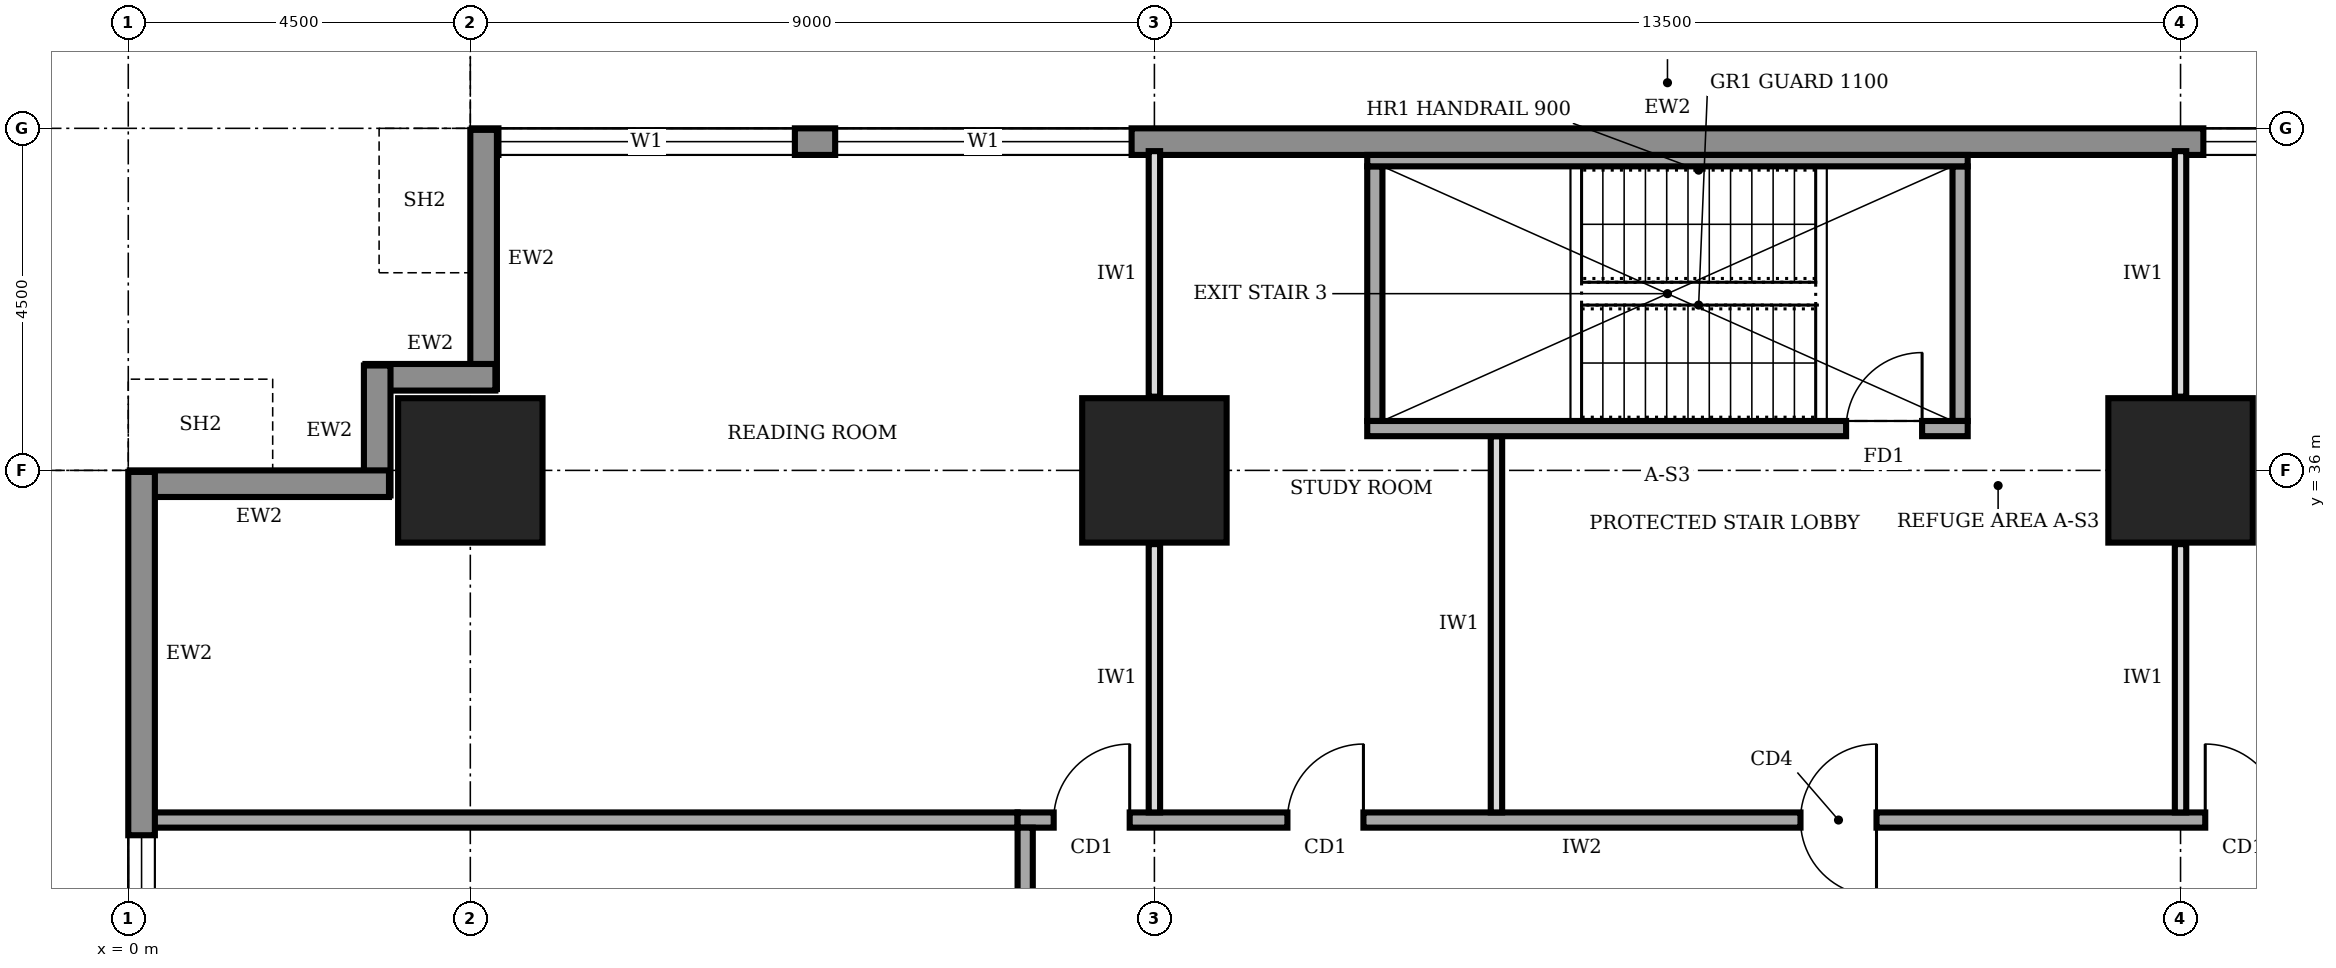
"""IFC4 building model, lengths in metres.
Left out: names, types, materials, properties, quantities, classifications, styles, units other than length and angle.
Written with IfcOpenShell. Run it as: python <this file> out.ifc"""

import sys

from ifc_helpers import new_model, si_unit, direction, frame, frame_2d, origin, origin_2d, place, context, subcontext, project, spatial, rectangle, extrude, element, fill, save


model = new_model("IFC4")
c1 = context("Model", 3, precision=1e-05, world=origin(), true_north=direction((0.0, 1.0)))
c2 = subcontext(c1, "Body", "Model", "MODEL_VIEW")
j1 = project(units=[si_unit("LENGTHUNIT", "METRE"), si_unit("PLANEANGLEUNIT", "RADIAN")], contexts=[c1])
p1 = place(None, origin())
s1 = spatial("IfcSite", under=j1, at=p1, CompositionType="ELEMENT")
p2 = place(p1, origin())
s2 = spatial("IfcBuilding", under=s1, at=p2, CompositionType="ELEMENT")
p3 = place(p2, frame((0.0, 0.0, 133.0)))
s3 = spatial("IfcBuildingStorey", under=s2, at=p3, CompositionType="ELEMENT", Elevation=133.0)
for number, where, z_axis, x_axis in (
    (1, (4.5, 36.0, 0.0), (0.0, 0.0, 1.0), (1.0, 0.0, 0.0)),
    (2, (13.5, 36.0, 0.0), (0.0, 0.0, 1.0), (1.0, 0.0, 0.0)),
    (3, (27.0, 36.0, 0.0), (0.0, 0.0, 1.0), (1.0, 0.0, 0.0)),
):
    element("IfcColumn", number, at=place(p3, frame(where, z_axis=z_axis, x_axis=x_axis)), inside=s3, PredefinedType="COLUMN", context=c2, shape_type="SweptSolid", body=[
        extrude(rectangle(XDim=1.9, YDim=1.9, at=origin_2d()), origin(), (0.0, 0.0, 1.0), 4.0),
    ])
p4 = place(p3, frame((35.98, 40.325, 0.0), z_axis=(0.0, 0.0, 1.0), x_axis=(-1.0, 0.0, 0.0)))
e4 = element("IfcWall", 4, at=p4, inside=s3, PredefinedType="STANDARD", context=c2, shape_type="SweptSolid", body=[
    extrude(rectangle(XDim=31.46, YDim=0.35, at=frame_2d((15.73, 0.0))), origin(), (0.0, 0.0, 1.0), 3.75),
])
p5 = place(p4, frame((27.21, 0.0, 0.9)))
e5 = element("IfcOpeningElement", 5, at=p5, cuts=e4, PredefinedType="OPENING", context=c2, shape_type="SweptSolid", body=[
    extrude(rectangle(XDim=3.9, YDim=2.2, at=frame_2d((1.95, 1.1))), frame((0.0, 0.185, 0.0), z_axis=(0.0, -1.0, 0.0), x_axis=(1.0, 0.0, 0.0)), (0.0, 0.0, 1.0), 0.37),
])
p6 = place(p4, frame((22.78, 0.0, 0.9)))
e6 = element("IfcOpeningElement", 6, at=p6, cuts=e4, PredefinedType="OPENING", context=c2, shape_type="SweptSolid", body=[
    extrude(rectangle(XDim=3.9, YDim=2.2, at=frame_2d((1.95, 1.1))), frame((0.0, 0.185, 0.0), z_axis=(0.0, -1.0, 0.0), x_axis=(1.0, 0.0, 0.0)), (0.0, 0.0, 1.0), 0.37),
])
p7 = place(p4, frame((4.78, 0.0, 0.9)))
e7 = element("IfcOpeningElement", 7, at=p7, cuts=e4, PredefinedType="OPENING", context=c2, shape_type="SweptSolid", body=[
    extrude(rectangle(XDim=3.9, YDim=2.2, at=frame_2d((1.95, 1.1))), frame((0.0, 0.185, 0.0), z_axis=(0.0, -1.0, 0.0), x_axis=(1.0, 0.0, 0.0)), (0.0, 0.0, 1.0), 0.37),
])
p8 = place(p3, frame((4.675, 40.48, 0.0), z_axis=(0.0, 0.0, 1.0), x_axis=(0.0, -1.0, 0.0)))
e8 = element("IfcWall", 8, at=p8, inside=s3, PredefinedType="STANDARD", context=c2, shape_type="SweptSolid", body=[
    extrude(rectangle(XDim=3.41, YDim=0.35, at=frame_2d((1.705, 0.0))), origin(), (0.0, 0.0, 1.0), 2.85),
])
for number, where, z_axis, x_axis in (
    (9, (4.83, 37.225, 0.0), (0.0, 0.0, 1.0), (-1.0, 0.0, 0.0)),
    (10, (3.275, 37.38, 0.0), (0.0, 0.0, 1.0), (0.0, -1.0, 0.0)),
):
    element("IfcWall", number, at=place(p3, frame(where, z_axis=z_axis, x_axis=x_axis)), inside=s3, PredefinedType="STANDARD", context=c2, shape_type="SweptSolid", body=[
        extrude(rectangle(XDim=1.71, YDim=0.35, at=frame_2d((0.855, 0.0))), origin(), (0.0, 0.0, 1.0), 3.75),
    ])
p9 = place(p3, frame((3.43, 35.825, 0.0), z_axis=(0.0, 0.0, 1.0), x_axis=(-1.0, 0.0, 0.0)))
e11 = element("IfcWall", 11, at=p9, inside=s3, PredefinedType="STANDARD", context=c2, shape_type="SweptSolid", body=[
    extrude(rectangle(XDim=3.41, YDim=0.35, at=frame_2d((1.705, 0.0))), origin(), (0.0, 0.0, 1.0), 2.85),
])
p10 = place(p3, frame((0.175, 35.98, 0.0), z_axis=(0.0, 0.0, 1.0), x_axis=(0.0, -1.0, 0.0)))
e12 = element("IfcWall", 12, at=p10, inside=s3, PredefinedType="STANDARD", context=c2, shape_type="SweptSolid", body=[
    extrude(rectangle(XDim=31.46, YDim=0.35, at=frame_2d((15.73, 0.0))), origin(), (0.0, 0.0, 1.0), 3.75),
])
p11 = place(p10, frame((27.21, 0.0, 0.9)))
e13 = element("IfcOpeningElement", 13, at=p11, cuts=e12, PredefinedType="OPENING", context=c2, shape_type="SweptSolid", body=[
    extrude(rectangle(XDim=3.9, YDim=2.2, at=frame_2d((1.95, 1.1))), frame((0.0, 0.185, 0.0), z_axis=(0.0, -1.0, 0.0), x_axis=(1.0, 0.0, 0.0)), (0.0, 0.0, 1.0), 0.37),
])
p12 = place(p10, frame((22.78, 0.0, 0.9)))
e14 = element("IfcOpeningElement", 14, at=p12, cuts=e12, PredefinedType="OPENING", context=c2, shape_type="SweptSolid", body=[
    extrude(rectangle(XDim=3.9, YDim=2.2, at=frame_2d((1.95, 1.1))), frame((0.0, 0.185, 0.0), z_axis=(0.0, -1.0, 0.0), x_axis=(1.0, 0.0, 0.0)), (0.0, 0.0, 1.0), 0.37),
])
p13 = place(p10, frame((18.28, 0.0, 0.9)))
e15 = element("IfcOpeningElement", 15, at=p13, cuts=e12, PredefinedType="OPENING", context=c2, shape_type="SweptSolid", body=[
    extrude(rectangle(XDim=3.9, YDim=2.2, at=frame_2d((1.95, 1.1))), frame((0.0, 0.185, 0.0), z_axis=(0.0, -1.0, 0.0), x_axis=(1.0, 0.0, 0.0)), (0.0, 0.0, 1.0), 0.37),
])
p14 = place(p10, frame((13.78, 0.0, 0.9)))
e16 = element("IfcOpeningElement", 16, at=p14, cuts=e12, PredefinedType="OPENING", context=c2, shape_type="SweptSolid", body=[
    extrude(rectangle(XDim=3.9, YDim=2.2, at=frame_2d((1.95, 1.1))), frame((0.0, 0.185, 0.0), z_axis=(0.0, -1.0, 0.0), x_axis=(1.0, 0.0, 0.0)), (0.0, 0.0, 1.0), 0.37),
])
p15 = place(p10, frame((9.28, 0.0, 0.9)))
e17 = element("IfcOpeningElement", 17, at=p15, cuts=e12, PredefinedType="OPENING", context=c2, shape_type="SweptSolid", body=[
    extrude(rectangle(XDim=3.9, YDim=2.2, at=frame_2d((1.95, 1.1))), frame((0.0, 0.185, 0.0), z_axis=(0.0, -1.0, 0.0), x_axis=(1.0, 0.0, 0.0)), (0.0, 0.0, 1.0), 0.37),
])
p16 = place(p10, frame((4.78, 0.0, 0.9)))
e18 = element("IfcOpeningElement", 18, at=p16, cuts=e12, PredefinedType="OPENING", context=c2, shape_type="SweptSolid", body=[
    extrude(rectangle(XDim=3.9, YDim=2.2, at=frame_2d((1.95, 1.1))), frame((0.0, 0.185, 0.0), z_axis=(0.0, -1.0, 0.0), x_axis=(1.0, 0.0, 0.0)), (0.0, 0.0, 1.0), 0.37),
])
p17 = place(p3, frame((28.6, 31.4, 0.0), z_axis=(0.0, 0.0, 1.0), x_axis=(-1.0, 0.0, 0.0)))
e19 = element("IfcWall", 19, at=p17, inside=s3, PredefinedType="SOLIDWALL", context=c2, shape_type="SweptSolid", body=[
    extrude(rectangle(XDim=16.9, YDim=0.2, at=frame_2d((8.45, 0.0))), origin(), (0.0, 0.0, 1.0), 3.75),
])
p18 = place(p17, frame((15.425, 0.0, 0.0)))
e20 = element("IfcOpeningElement", 20, at=p18, cuts=e19, PredefinedType="OPENING", context=c2, shape_type="SweptSolid", body=[
    extrude(rectangle(XDim=1.0, YDim=2.1, at=frame_2d((0.5, 1.05))), frame((0.0, 0.11, 0.0), z_axis=(0.0, -1.0, 0.0), x_axis=(1.0, 0.0, 0.0)), (0.0, 0.0, 1.0), 0.22),
])
p19 = place(p17, frame((12.35, 0.0, 0.0)))
e21 = element("IfcOpeningElement", 21, at=p19, cuts=e19, PredefinedType="OPENING", context=c2, shape_type="SweptSolid", body=[
    extrude(rectangle(XDim=1.0, YDim=2.1, at=frame_2d((0.5, 1.05))), frame((0.0, 0.11, 0.0), z_axis=(0.0, -1.0, 0.0), x_axis=(1.0, 0.0, 0.0)), (0.0, 0.0, 1.0), 0.22),
])
p20 = place(p17, frame((5.6, 0.0, 0.0)))
e22 = element("IfcOpeningElement", 22, at=p20, cuts=e19, PredefinedType="OPENING", context=c2, shape_type="SweptSolid", body=[
    extrude(rectangle(XDim=1.0, YDim=2.1, at=frame_2d((0.5, 1.05))), frame((0.0, 0.11, 0.0), z_axis=(0.0, -1.0, 0.0), x_axis=(1.0, 0.0, 0.0)), (0.0, 0.0, 1.0), 0.22),
])
p21 = place(p17, frame((0.275, 0.0, 0.0)))
e23 = element("IfcOpeningElement", 23, at=p21, cuts=e19, PredefinedType="OPENING", context=c2, shape_type="SweptSolid", body=[
    extrude(rectangle(XDim=1.0, YDim=2.1, at=frame_2d((0.5, 1.05))), frame((0.0, 0.11, 0.0), z_axis=(0.0, -1.0, 0.0), x_axis=(1.0, 0.0, 0.0)), (0.0, 0.0, 1.0), 0.22),
])
p22 = place(p3, frame((11.8, 31.3, 0.0), z_axis=(0.0, 0.0, 1.0), x_axis=(0.0, -1.0, 0.0)))
e24 = element("IfcWall", 24, at=p22, inside=s3, PredefinedType="SOLIDWALL", context=c2, shape_type="SweptSolid", body=[
    extrude(rectangle(XDim=23.8, YDim=0.2, at=frame_2d((11.9, 0.0))), origin(), (0.0, 0.0, 1.0), 3.75),
])
p23 = place(p22, frame((20.3, 0.0, 0.0)))
e25 = element("IfcOpeningElement", 25, at=p23, cuts=e24, PredefinedType="OPENING", context=c2, shape_type="SweptSolid", body=[
    extrude(rectangle(XDim=1.0, YDim=2.1, at=frame_2d((0.5, 1.05))), frame((0.0, 0.11, 0.0), z_axis=(0.0, -1.0, 0.0), x_axis=(1.0, 0.0, 0.0)), (0.0, 0.0, 1.0), 0.22),
])
p24 = place(p22, frame((15.45, 0.0, 0.0)))
e26 = element("IfcOpeningElement", 26, at=p24, cuts=e24, PredefinedType="OPENING", context=c2, shape_type="SweptSolid", body=[
    extrude(rectangle(XDim=0.9, YDim=2.1, at=frame_2d((0.45, 1.05))), frame((0.0, 0.11, 0.0), z_axis=(0.0, -1.0, 0.0), x_axis=(1.0, 0.0, 0.0)), (0.0, 0.0, 1.0), 0.22),
])
p25 = place(p22, frame((12.45, 0.0, 0.0)))
e27 = element("IfcOpeningElement", 27, at=p25, cuts=e24, PredefinedType="OPENING", context=c2, shape_type="SweptSolid", body=[
    extrude(rectangle(XDim=0.9, YDim=2.1, at=frame_2d((0.45, 1.05))), frame((0.0, 0.11, 0.0), z_axis=(0.0, -1.0, 0.0), x_axis=(1.0, 0.0, 0.0)), (0.0, 0.0, 1.0), 0.22),
])
p26 = place(p22, frame((7.6, 0.0, 0.0)))
e28 = element("IfcOpeningElement", 28, at=p26, cuts=e24, PredefinedType="OPENING", context=c2, shape_type="SweptSolid", body=[
    extrude(rectangle(XDim=0.9, YDim=2.1, at=frame_2d((0.45, 1.05))), frame((0.0, 0.11, 0.0), z_axis=(0.0, -1.0, 0.0), x_axis=(1.0, 0.0, 0.0)), (0.0, 0.0, 1.0), 0.22),
])
p27 = place(p22, frame((4.8, 0.0, 0.0)))
e29 = element("IfcOpeningElement", 29, at=p27, cuts=e24, PredefinedType="OPENING", context=c2, shape_type="SweptSolid", body=[
    extrude(rectangle(XDim=1.0, YDim=2.1, at=frame_2d((0.5, 1.05))), frame((0.0, 0.11, 0.0), z_axis=(0.0, -1.0, 0.0), x_axis=(1.0, 0.0, 0.0)), (0.0, 0.0, 1.0), 0.22),
])
p28 = place(p22, frame((10.3, 0.0, 0.0)))
e30 = element("IfcOpeningElement", 30, at=p28, cuts=e24, PredefinedType="OPENING", context=c2, shape_type="SweptSolid", body=[
    extrude(rectangle(XDim=1.0, YDim=2.1, at=frame_2d((0.5, 1.05))), frame((0.0, 0.11, 0.0), z_axis=(0.0, -1.0, 0.0), x_axis=(1.0, 0.0, 0.0)), (0.0, 0.0, 1.0), 0.22),
])
p29 = place(p22, frame((1.55, 0.0, 0.0)))
e31 = element("IfcOpeningElement", 31, at=p29, cuts=e24, PredefinedType="OPENING", context=c2, shape_type="SweptSolid", body=[
    extrude(rectangle(XDim=1.0, YDim=2.1, at=frame_2d((0.5, 1.05))), frame((0.0, 0.11, 0.0), z_axis=(0.0, -1.0, 0.0), x_axis=(1.0, 0.0, 0.0)), (0.0, 0.0, 1.0), 0.22),
])
p30 = place(p3, frame((0.3, 31.4, 0.0), z_axis=(0.0, 0.0, 1.0), x_axis=(1.0, 0.0, 0.0)))
e32 = element("IfcWall", 32, at=p30, inside=s3, PredefinedType="SOLIDWALL", context=c2, shape_type="SweptSolid", body=[
    extrude(rectangle(XDim=11.4, YDim=0.2, at=frame_2d((5.7, 0.0))), origin(), (0.0, 0.0, 1.0), 3.75),
])
p31 = place(p3, frame((13.5, 31.5, 0.0), z_axis=(0.0, 0.0, 1.0), x_axis=(0.0, 1.0, 0.0)))
e33 = element("IfcWall", 33, at=p31, inside=s3, PredefinedType="PARTITIONING", context=c2, shape_type="SweptSolid", body=[
    extrude(rectangle(XDim=3.53, YDim=0.15, at=frame_2d((1.765, 0.0))), origin(), (0.0, 0.0, 1.0), 2.85),
])
p32 = place(p3, frame((13.5, 36.97, 0.0), z_axis=(0.0, 0.0, 1.0), x_axis=(0.0, 1.0, 0.0)))
e34 = element("IfcWall", 34, at=p32, inside=s3, PredefinedType="PARTITIONING", context=c2, shape_type="SweptSolid", body=[
    extrude(rectangle(XDim=3.23, YDim=0.15, at=frame_2d((1.615, 0.0))), origin(), (0.0, 0.0, 1.0), 2.85),
])
p33 = place(p3, frame((18.0, 31.5, 0.0), z_axis=(0.0, 0.0, 1.0), x_axis=(0.0, 1.0, 0.0)))
e35 = element("IfcWall", 35, at=p33, inside=s3, PredefinedType="PARTITIONING", context=c2, shape_type="SweptSolid", body=[
    extrude(rectangle(XDim=4.95, YDim=0.15, at=frame_2d((2.475, 0.0))), origin(), (0.0, 0.0, 1.0), 3.75),
])
p34 = place(p3, frame((27.0, 31.5, 0.0), z_axis=(0.0, 0.0, 1.0), x_axis=(0.0, 1.0, 0.0)))
e36 = element("IfcWall", 36, at=p34, inside=s3, PredefinedType="PARTITIONING", context=c2, shape_type="SweptSolid", body=[
    extrude(rectangle(XDim=3.53, YDim=0.15, at=frame_2d((1.765, 0.0))), origin(), (0.0, 0.0, 1.0), 2.85),
])
p35 = place(p3, frame((27.0, 36.97, 0.0), z_axis=(0.0, 0.0, 1.0), x_axis=(0.0, 1.0, 0.0)))
e37 = element("IfcWall", 37, at=p35, inside=s3, PredefinedType="PARTITIONING", context=c2, shape_type="SweptSolid", body=[
    extrude(rectangle(XDim=3.23, YDim=0.15, at=frame_2d((1.615, 0.0))), origin(), (0.0, 0.0, 1.0), 2.85),
])
p36 = place(p3, frame((16.3, 36.55, 0.0), z_axis=(0.0, 0.0, 1.0), x_axis=(1.0, 0.0, 0.0)))
e38 = element("IfcWall", 38, at=p36, inside=s3, PredefinedType="SOLIDWALL", context=c2, shape_type="SweptSolid", body=[
    extrude(rectangle(XDim=7.9, YDim=0.2, at=frame_2d((3.95, 0.0))), origin(), (0.0, 0.0, 1.0), 3.75),
])
p37 = place(p36, frame((6.3, 0.0, 0.0)))
e39 = element("IfcOpeningElement", 39, at=p37, cuts=e38, PredefinedType="OPENING", context=c2, shape_type="SweptSolid", body=[
    extrude(rectangle(XDim=1.0, YDim=2.1, at=frame_2d((0.5, 1.05))), frame((0.0, 0.11, 0.0), z_axis=(0.0, -1.0, 0.0), x_axis=(1.0, 0.0, 0.0)), (0.0, 0.0, 1.0), 0.22),
])
p38 = place(p3, frame((16.3, 40.075, 0.0), z_axis=(0.0, 0.0, 1.0), x_axis=(1.0, 0.0, 0.0)))
e40 = element("IfcWall", 40, at=p38, inside=s3, PredefinedType="SOLIDWALL", context=c2, shape_type="SweptSolid", body=[
    extrude(rectangle(XDim=7.9, YDim=0.15, at=frame_2d((3.95, 0.0))), origin(), (0.0, 0.0, 1.0), 3.75),
])
for number, where, z_axis, x_axis in (
    (41, (16.4, 36.65, 0.0), (0.0, 0.0, 1.0), (0.0, 1.0, 0.0)),
    (42, (24.1, 36.65, 0.0), (0.0, 0.0, 1.0), (0.0, 1.0, 0.0)),
):
    element("IfcWall", number, at=place(p3, frame(where, z_axis=z_axis, x_axis=x_axis)), inside=s3, PredefinedType="SOLIDWALL", context=c2, shape_type="SweptSolid", body=[
        extrude(rectangle(XDim=3.35, YDim=0.2, at=frame_2d((1.675, 0.0))), origin(), (0.0, 0.0, 1.0), 3.75),
    ])
p39 = place(p5, origin())
e43 = element("IfcWindow", 43, at=p39, inside=s3, PartitioningType="SINGLE_PANEL", PredefinedType="WINDOW", context=c2, shape_type="SweptSolid", body=[
    extrude(rectangle(XDim=3.9, YDim=2.2, at=frame_2d((1.95, 1.1))), frame((0.0, 0.03, 0.0), z_axis=(0.0, -1.0, 0.0), x_axis=(1.0, 0.0, 0.0)), (0.0, 0.0, 1.0), 0.06),
])
fill(e5, e43)
p40 = place(p6, origin())
e44 = element("IfcWindow", 44, at=p40, inside=s3, PartitioningType="SINGLE_PANEL", PredefinedType="WINDOW", context=c2, shape_type="SweptSolid", body=[
    extrude(rectangle(XDim=3.9, YDim=2.2, at=frame_2d((1.95, 1.1))), frame((0.0, 0.03, 0.0), z_axis=(0.0, -1.0, 0.0), x_axis=(1.0, 0.0, 0.0)), (0.0, 0.0, 1.0), 0.06),
])
fill(e6, e44)
p41 = place(p7, origin())
e45 = element("IfcWindow", 45, at=p41, inside=s3, PartitioningType="SINGLE_PANEL", PredefinedType="WINDOW", context=c2, shape_type="SweptSolid", body=[
    extrude(rectangle(XDim=3.9, YDim=2.2, at=frame_2d((1.95, 1.1))), frame((0.0, 0.03, 0.0), z_axis=(0.0, -1.0, 0.0), x_axis=(1.0, 0.0, 0.0)), (0.0, 0.0, 1.0), 0.06),
])
fill(e7, e45)
p42 = place(p16, origin())
e46 = element("IfcWindow", 46, at=p42, inside=s3, PartitioningType="SINGLE_PANEL", PredefinedType="WINDOW", context=c2, shape_type="SweptSolid", body=[
    extrude(rectangle(XDim=3.9, YDim=2.2, at=frame_2d((1.95, 1.1))), frame((0.0, 0.03, 0.0), z_axis=(0.0, -1.0, 0.0), x_axis=(1.0, 0.0, 0.0)), (0.0, 0.0, 1.0), 0.06),
])
fill(e18, e46)
p43 = place(p18, frame((1.0, 0.0, 0.0), z_axis=(0.0, 0.0, 1.0), x_axis=(-1.0, 0.0, 0.0)))
e47 = element("IfcDoor", 47, at=p43, inside=s3, OperationType="SINGLE_SWING_RIGHT", PredefinedType="DOOR", context=c2, shape_type="SweptSolid", body=[
    extrude(rectangle(XDim=1.0, YDim=2.1, at=frame_2d((0.5, 1.05))), frame((0.0, 0.025, 0.0), z_axis=(0.0, -1.0, 0.0), x_axis=(1.0, 0.0, 0.0)), (0.0, 0.0, 1.0), 0.05),
])
fill(e20, e47)
p44 = place(p19, frame((1.0, 0.0, 0.0), z_axis=(0.0, 0.0, 1.0), x_axis=(-1.0, 0.0, 0.0)))
e48 = element("IfcDoor", 48, at=p44, inside=s3, OperationType="SINGLE_SWING_RIGHT", PredefinedType="DOOR", context=c2, shape_type="SweptSolid", body=[
    extrude(rectangle(XDim=1.0, YDim=2.1, at=frame_2d((0.5, 1.05))), frame((0.0, 0.025, 0.0), z_axis=(0.0, -1.0, 0.0), x_axis=(1.0, 0.0, 0.0)), (0.0, 0.0, 1.0), 0.05),
])
fill(e21, e48)
p45 = place(p20, origin())
e49 = element("IfcDoor", 49, at=p45, inside=s3, OperationType="DOUBLE_SWING_LEFT", PredefinedType="DOOR", context=c2, shape_type="SweptSolid", body=[
    extrude(rectangle(XDim=1.0, YDim=2.1, at=frame_2d((0.5, 1.05))), frame((0.0, 0.025, 0.0), z_axis=(0.0, -1.0, 0.0), x_axis=(1.0, 0.0, 0.0)), (0.0, 0.0, 1.0), 0.05),
])
fill(e22, e49)
p46 = place(p21, frame((1.0, 0.0, 0.0), z_axis=(0.0, 0.0, 1.0), x_axis=(-1.0, 0.0, 0.0)))
e50 = element("IfcDoor", 50, at=p46, inside=s3, OperationType="SINGLE_SWING_LEFT", PredefinedType="DOOR", context=c2, shape_type="SweptSolid", body=[
    extrude(rectangle(XDim=1.0, YDim=2.1, at=frame_2d((0.5, 1.05))), frame((0.0, 0.025, 0.0), z_axis=(0.0, -1.0, 0.0), x_axis=(1.0, 0.0, 0.0)), (0.0, 0.0, 1.0), 0.05),
])
fill(e23, e50)
p47 = place(p37, origin())
e51 = element("IfcDoor", 51, at=p47, inside=s3, OperationType="SINGLE_SWING_RIGHT", PredefinedType="DOOR", context=c2, shape_type="SweptSolid", body=[
    extrude(rectangle(XDim=1.0, YDim=2.1, at=frame_2d((0.5, 1.05))), frame((0.0, 0.025, 0.0), z_axis=(0.0, -1.0, 0.0), x_axis=(1.0, 0.0, 0.0)), (0.0, 0.0, 1.0), 0.05),
])
fill(e39, e51)
save(model, sys.argv[1])
